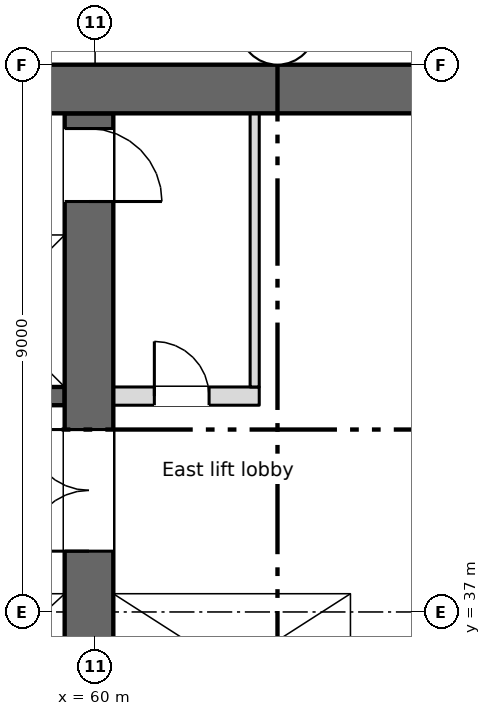
"""IFC4 building model, lengths in metres.
Left out: names, types, materials, properties, quantities, classifications, styles, units other than length and angle.
Written with IfcOpenShell. Run it as: python <this file> out.ifc"""

import sys

from ifc_helpers import new_model, si_unit, direction, frame, frame_2d, origin, place, context, subcontext, project, spatial, rectangle, extrude, element, fill, save


model = new_model("IFC4")
c1 = context("Model", 3, precision=1e-05, world=origin(), true_north=direction((0.0, 1.0)))
c2 = subcontext(c1, "Body", "Model", "MODEL_VIEW")
j1 = project(units=[si_unit("LENGTHUNIT", "METRE"), si_unit("PLANEANGLEUNIT", "RADIAN")], contexts=[c1])
p1 = place(None, origin())
s1 = spatial("IfcSite", under=j1, at=p1, CompositionType="ELEMENT")
p2 = place(p1, origin())
s2 = spatial("IfcBuilding", under=s1, at=p2, CompositionType="ELEMENT")
p3 = place(p2, frame((0.0, 0.0, 151.25)))
s3 = spatial("IfcBuildingStorey", under=s2, at=p3, CompositionType="ELEMENT", Elevation=151.25)
p4 = place(p3, frame((5.55, 45.6, 0.0), z_axis=(0.0, 0.0, 1.0), x_axis=(1.0, 0.0, 0.0)))
e1 = element("IfcWall", 1, at=p4, inside=s3, PredefinedType="SHEAR", context=c2, shape_type="SweptSolid", body=[
    extrude(rectangle(XDim=60.9, YDim=0.8, at=frame_2d((30.45, 0.0))), origin(), (0.0, 0.0, 1.0), 3.35),
])
p5 = place(p4, frame((1.2, 0.0, 0.6)))
e2 = element("IfcOpeningElement", 2, at=p5, cuts=e1, PredefinedType="OPENING", context=c2, shape_type="SweptSolid", body=[
    extrude(rectangle(XDim=0.6, YDim=2.4, at=frame_2d((0.3, 1.2))), frame((0.0, 0.41, 0.0), z_axis=(0.0, -1.0, 0.0), x_axis=(1.0, 0.0, 0.0)), (0.0, 0.0, 1.0), 0.82),
])
p6 = place(p4, frame((7.2, 0.0, 0.6)))
e3 = element("IfcOpeningElement", 3, at=p6, cuts=e1, PredefinedType="OPENING", context=c2, shape_type="SweptSolid", body=[
    extrude(rectangle(XDim=0.6, YDim=2.4, at=frame_2d((0.3, 1.2))), frame((0.0, 0.41, 0.0), z_axis=(0.0, -1.0, 0.0), x_axis=(1.0, 0.0, 0.0)), (0.0, 0.0, 1.0), 0.82),
])
p7 = place(p3, frame((64.35, 34.8, 0.0), z_axis=(0.0, 0.0, 1.0), x_axis=(0.0, 1.0, 0.0)))
e4 = element("IfcWall", 4, at=p7, inside=s3, PredefinedType="SHEAR", context=c2, shape_type="SweptSolid", body=[
    extrude(rectangle(XDim=10.4, YDim=0.3, at=frame_2d((5.2, 0.0))), origin(), (0.0, 0.0, 1.0), 3.35),
])
p8 = place(p3, frame((59.9, 28.4, 0.0), z_axis=(0.0, 0.0, 1.0), x_axis=(0.0, 1.0, 0.0)))
e5 = element("IfcWall", 5, at=p8, inside=s3, PredefinedType="SHEAR", context=c2, shape_type="SweptSolid", body=[
    extrude(rectangle(XDim=16.8, YDim=0.8, at=frame_2d((8.4, 0.0))), origin(), (0.0, 0.0, 1.0), 3.35),
])
p9 = place(p8, frame((9.6, 0.0, 0.0)))
e6 = element("IfcOpeningElement", 6, at=p9, cuts=e5, PredefinedType="OPENING", context=c2, shape_type="SweptSolid", body=[
    extrude(rectangle(XDim=2.0, YDim=2.1, at=frame_2d((1.0, 1.05))), frame((0.0, 0.41, 0.0), z_axis=(0.0, -1.0, 0.0), x_axis=(1.0, 0.0, 0.0)), (0.0, 0.0, 1.0), 0.82),
])
p10 = place(p8, frame((15.35, 0.0, 0.0)))
e7 = element("IfcOpeningElement", 7, at=p10, cuts=e5, PredefinedType="OPENING", context=c2, shape_type="SweptSolid", body=[
    extrude(rectangle(XDim=1.2, YDim=2.1, at=frame_2d((0.6, 1.05))), frame((0.0, 0.41, 0.0), z_axis=(0.0, -1.0, 0.0), x_axis=(1.0, 0.0, 0.0)), (0.0, 0.0, 1.0), 0.82),
])
p11 = place(p3, frame((47.3, 37.45, 0.0), z_axis=(0.0, 0.0, 1.0), x_axis=(1.0, 0.0, 0.0)))
e8 = element("IfcWall", 8, at=p11, inside=s3, PredefinedType="SHEAR", context=c2, shape_type="SweptSolid", body=[
    extrude(rectangle(XDim=12.2, YDim=0.3, at=frame_2d((6.1, 0.0))), origin(), (0.0, 0.0, 1.0), 3.35),
])
p12 = place(p11, frame((4.3, 0.0, 0.0)))
e9 = element("IfcOpeningElement", 9, at=p12, cuts=e8, PredefinedType="OPENING", context=c2, shape_type="SweptSolid", body=[
    extrude(rectangle(XDim=1.1, YDim=2.1, at=frame_2d((0.55, 1.05))), frame((0.0, 0.16, 0.0), z_axis=(0.0, -1.0, 0.0), x_axis=(1.0, 0.0, 0.0)), (0.0, 0.0, 1.0), 0.32),
])
p13 = place(p11, frame((7.3, 0.0, 0.0)))
e10 = element("IfcOpeningElement", 10, at=p13, cuts=e8, PredefinedType="OPENING", context=c2, shape_type="SweptSolid", body=[
    extrude(rectangle(XDim=1.1, YDim=2.1, at=frame_2d((0.55, 1.05))), frame((0.0, 0.16, 0.0), z_axis=(0.0, -1.0, 0.0), x_axis=(1.0, 0.0, 0.0)), (0.0, 0.0, 1.0), 0.32),
])
p14 = place(p11, frame((10.3, 0.0, 0.0)))
e11 = element("IfcOpeningElement", 11, at=p14, cuts=e8, PredefinedType="OPENING", context=c2, shape_type="SweptSolid", body=[
    extrude(rectangle(XDim=1.1, YDim=2.1, at=frame_2d((0.55, 1.05))), frame((0.0, 0.16, 0.0), z_axis=(0.0, -1.0, 0.0), x_axis=(1.0, 0.0, 0.0)), (0.0, 0.0, 1.0), 0.32),
])
p15 = place(p3, frame((60.3, 37.45, 0.0), z_axis=(0.0, 0.0, 1.0), x_axis=(1.0, 0.0, 0.0)))
e12 = element("IfcWall", 12, at=p15, inside=s3, PredefinedType="SHEAR", context=c2, shape_type="SweptSolid", body=[
    extrude(rectangle(XDim=3.9, YDim=0.3, at=frame_2d((1.95, 0.0))), origin(), (0.0, 0.0, 1.0), 3.35),
])
p16 = place(p15, frame((1.4, 0.0, 0.0)))
e13 = element("IfcOpeningElement", 13, at=p16, cuts=e12, PredefinedType="OPENING", context=c2, shape_type="SweptSolid", body=[
    extrude(rectangle(XDim=1.1, YDim=2.1, at=frame_2d((0.55, 1.05))), frame((0.0, 0.16, 0.0), z_axis=(0.0, -1.0, 0.0), x_axis=(1.0, 0.0, 0.0)), (0.0, 0.0, 1.0), 0.32),
])
p17 = place(p3, frame((18.5, 40.55, 0.0), z_axis=(0.0, 0.0, 1.0), x_axis=(1.0, 0.0, 0.0)))
e14 = element("IfcWall", 14, at=p17, inside=s3, PredefinedType="SHEAR", context=c2, shape_type="SweptSolid", body=[
    extrude(rectangle(XDim=41.0, YDim=0.3, at=frame_2d((20.5, 0.0))), origin(), (0.0, 0.0, 1.0), 3.35),
])
p18 = place(p17, frame((18.65, 0.0, 0.0)))
e15 = element("IfcOpeningElement", 15, at=p18, cuts=e14, PredefinedType="OPENING", context=c2, shape_type="SweptSolid", body=[
    extrude(rectangle(XDim=0.9, YDim=2.1, at=frame_2d((0.45, 1.05))), frame((0.0, 0.16, 0.0), z_axis=(0.0, -1.0, 0.0), x_axis=(1.0, 0.0, 0.0)), (0.0, 0.0, 1.0), 0.32),
])
p19 = place(p17, frame((6.175, 0.0, 0.0)))
e16 = element("IfcOpeningElement", 16, at=p19, cuts=e14, PredefinedType="OPENING", context=c2, shape_type="SweptSolid", body=[
    extrude(rectangle(XDim=1.1, YDim=2.1, at=frame_2d((0.55, 1.05))), frame((0.0, 0.16, 0.0), z_axis=(0.0, -1.0, 0.0), x_axis=(1.0, 0.0, 0.0)), (0.0, 0.0, 1.0), 0.32),
])
p20 = place(p17, frame((8.925, 0.0, 0.0)))
e17 = element("IfcOpeningElement", 17, at=p20, cuts=e14, PredefinedType="OPENING", context=c2, shape_type="SweptSolid", body=[
    extrude(rectangle(XDim=1.1, YDim=2.1, at=frame_2d((0.55, 1.05))), frame((0.0, 0.16, 0.0), z_axis=(0.0, -1.0, 0.0), x_axis=(1.0, 0.0, 0.0)), (0.0, 0.0, 1.0), 0.32),
])
p21 = place(p17, frame((11.675, 0.0, 0.0)))
e18 = element("IfcOpeningElement", 18, at=p21, cuts=e14, PredefinedType="OPENING", context=c2, shape_type="SweptSolid", body=[
    extrude(rectangle(XDim=1.1, YDim=2.1, at=frame_2d((0.55, 1.05))), frame((0.0, 0.16, 0.0), z_axis=(0.0, -1.0, 0.0), x_axis=(1.0, 0.0, 0.0)), (0.0, 0.0, 1.0), 0.32),
])
p22 = place(p17, frame((30.925, 0.0, 0.0)))
e19 = element("IfcOpeningElement", 19, at=p22, cuts=e14, PredefinedType="OPENING", context=c2, shape_type="SweptSolid", body=[
    extrude(rectangle(XDim=1.1, YDim=2.1, at=frame_2d((0.55, 1.05))), frame((0.0, 0.16, 0.0), z_axis=(0.0, -1.0, 0.0), x_axis=(1.0, 0.0, 0.0)), (0.0, 0.0, 1.0), 0.32),
])
p23 = place(p17, frame((33.675, 0.0, 0.0)))
e20 = element("IfcOpeningElement", 20, at=p23, cuts=e14, PredefinedType="OPENING", context=c2, shape_type="SweptSolid", body=[
    extrude(rectangle(XDim=1.1, YDim=2.1, at=frame_2d((0.55, 1.05))), frame((0.0, 0.16, 0.0), z_axis=(0.0, -1.0, 0.0), x_axis=(1.0, 0.0, 0.0)), (0.0, 0.0, 1.0), 0.32),
])
p24 = place(p17, frame((36.375, 0.0, 0.0)))
e21 = element("IfcOpeningElement", 21, at=p24, cuts=e14, PredefinedType="OPENING", context=c2, shape_type="SweptSolid", body=[
    extrude(rectangle(XDim=1.2, YDim=2.1, at=frame_2d((0.6, 1.05))), frame((0.0, 0.16, 0.0), z_axis=(0.0, -1.0, 0.0), x_axis=(1.0, 0.0, 0.0)), (0.0, 0.0, 1.0), 0.32),
])
p25 = place(p17, frame((39.15, 0.0, 0.0)))
e22 = element("IfcOpeningElement", 22, at=p25, cuts=e14, PredefinedType="OPENING", context=c2, shape_type="SweptSolid", body=[
    extrude(rectangle(XDim=1.2, YDim=2.1, at=frame_2d((0.6, 1.05))), frame((0.0, 0.16, 0.0), z_axis=(0.0, -1.0, 0.0), x_axis=(1.0, 0.0, 0.0)), (0.0, 0.0, 1.0), 0.32),
])
p26 = place(p3, frame((18.5, 43.35, 0.0), z_axis=(0.0, 0.0, 1.0), x_axis=(1.0, 0.0, 0.0)))
e23 = element("IfcWall", 23, at=p26, inside=s3, PredefinedType="SHEAR", context=c2, shape_type="SweptSolid", body=[
    extrude(rectangle(XDim=41.0, YDim=0.3, at=frame_2d((20.5, 0.0))), origin(), (0.0, 0.0, 1.0), 3.35),
])
p27 = place(p3, frame((60.3, 40.55, 0.0), z_axis=(0.0, 0.0, 1.0), x_axis=(1.0, 0.0, 0.0)))
e24 = element("IfcWall", 24, at=p27, inside=s3, PredefinedType="PARTITIONING", context=c2, shape_type="SweptSolid", body=[
    extrude(rectangle(XDim=2.4, YDim=0.3, at=frame_2d((1.2, 0.0))), origin(), (0.0, 0.0, 1.0), 3.35),
])
p28 = place(p27, frame((0.675, 0.0, 0.0)))
e25 = element("IfcOpeningElement", 25, at=p28, cuts=e24, PredefinedType="OPENING", context=c2, shape_type="SweptSolid", body=[
    extrude(rectangle(XDim=0.9, YDim=2.1, at=frame_2d((0.45, 1.05))), frame((0.0, 0.16, 0.0), z_axis=(0.0, -1.0, 0.0), x_axis=(1.0, 0.0, 0.0)), (0.0, 0.0, 1.0), 0.32),
])
p29 = place(p3, frame((62.625, 40.7, 0.0), z_axis=(0.0, 0.0, 1.0), x_axis=(0.0, 1.0, 0.0)))
e26 = element("IfcWall", 26, at=p29, inside=s3, PredefinedType="PARTITIONING", context=c2, shape_type="SweptSolid", body=[
    extrude(rectangle(XDim=4.5, YDim=0.15, at=frame_2d((2.25, 0.0))), origin(), (0.0, 0.0, 1.0), 3.35),
])
p30 = place(p28, origin())
e27 = element("IfcDoor", 27, at=p30, inside=s3, OperationType="SINGLE_SWING_LEFT", PredefinedType="DOOR", context=c2, shape_type="SweptSolid", body=[
    extrude(rectangle(XDim=0.9, YDim=2.1, at=frame_2d((0.45, 1.05))), frame((0.0, 0.025, 0.0), z_axis=(0.0, -1.0, 0.0), x_axis=(1.0, 0.0, 0.0)), (0.0, 0.0, 1.0), 0.05),
])
fill(e25, e27)
p31 = place(p16, origin())
e28 = element("IfcDoor", 28, at=p31, inside=s3, OperationType="SLIDING_TO_LEFT", PredefinedType="DOOR", context=c2, shape_type="SweptSolid", body=[
    extrude(rectangle(XDim=1.1, YDim=2.1, at=frame_2d((0.55, 1.05))), frame((0.0, 0.025, 0.0), z_axis=(0.0, -1.0, 0.0), x_axis=(1.0, 0.0, 0.0)), (0.0, 0.0, 1.0), 0.05),
])
fill(e13, e28)
p32 = place(p9, origin())
e29 = element("IfcDoor", 29, at=p32, inside=s3, OperationType="DOUBLE_DOOR_SINGLE_SWING", PredefinedType="DOOR", context=c2, shape_type="SweptSolid", body=[
    extrude(rectangle(XDim=2.0, YDim=2.1, at=frame_2d((1.0, 1.05))), frame((0.0, 0.025, 0.0), z_axis=(0.0, -1.0, 0.0), x_axis=(1.0, 0.0, 0.0)), (0.0, 0.0, 1.0), 0.05),
])
fill(e6, e29)
p33 = place(p10, origin())
e30 = element("IfcDoor", 30, at=p33, inside=s3, OperationType="SINGLE_SWING_LEFT", PredefinedType="DOOR", context=c2, shape_type="SweptSolid", body=[
    extrude(rectangle(XDim=1.2, YDim=2.1, at=frame_2d((0.6, 1.05))), frame((0.0, 0.025, 0.0), z_axis=(0.0, -1.0, 0.0), x_axis=(1.0, 0.0, 0.0)), (0.0, 0.0, 1.0), 0.05),
])
fill(e7, e30)
save(model, sys.argv[1])
